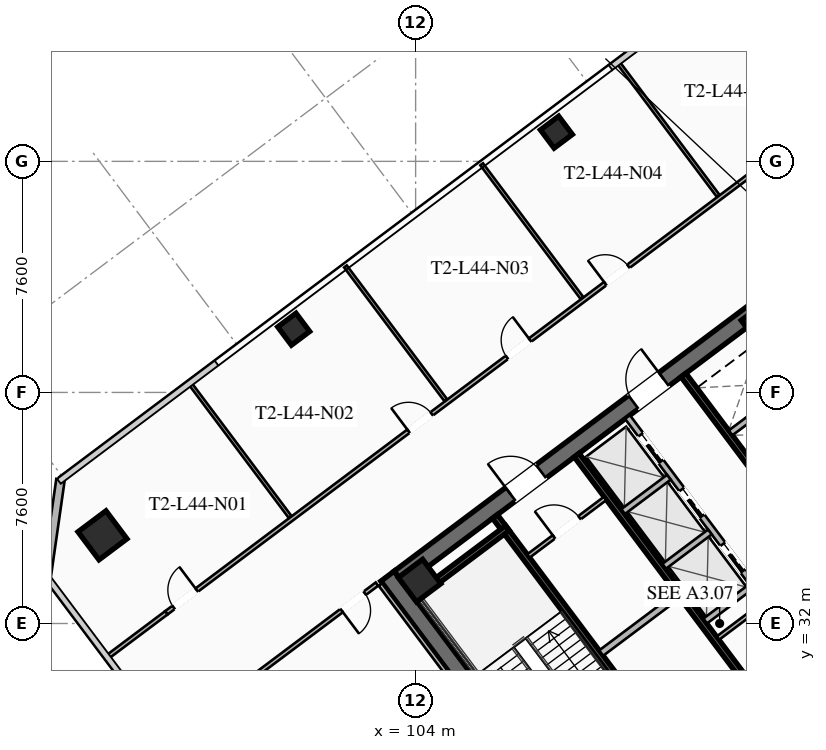
"""IFC4 building model, lengths in metres.
Left out: names, types, materials, properties, quantities, classifications, styles, units other than length and angle.
Written with IfcOpenShell. Run it as: python <this file> out.ifc"""

import sys

from ifc_helpers import new_model, si_unit, direction, frame, frame_2d, origin, origin_2d, place, context, subcontext, project, spatial, rectangle, hollow_rectangle, extrude, element, fill, save


model = new_model("IFC4")
c1 = context("Model", 3, precision=1e-05, world=origin(), true_north=direction((0.0, 1.0)))
c2 = subcontext(c1, "Body", "Model", "MODEL_VIEW")
j1 = project(units=[si_unit("LENGTHUNIT", "METRE"), si_unit("PLANEANGLEUNIT", "RADIAN")], contexts=[c1])
p1 = place(None, origin())
s1 = spatial("IfcSite", under=j1, at=p1, CompositionType="ELEMENT")
p2 = place(p1, origin())
s2 = spatial("IfcBuilding", under=s1, at=p2, CompositionType="ELEMENT")
p3 = place(p2, frame((0.0, 0.0, 164.1)))
s3 = spatial("IfcBuildingStorey", under=s2, at=p3, CompositionType="ELEMENT", Elevation=164.1)
p4 = place(p3, frame((112.436, 21.077, 0.0), z_axis=(0.0, 0.0, 1.0), x_axis=(-0.600005007985, 0.799996243986, 0.0)))
e1 = element("IfcWall", 1, at=p4, inside=s3, PredefinedType="SHEAR", context=c2, shape_type="SweptSolid", body=[
    extrude(rectangle(XDim=15.6, YDim=0.55, at=frame_2d((7.8, 0.0))), origin(), (0.0, 0.0, 1.0), 3.55),
])
p5 = place(p3, frame((124.539, 30.498, 0.0), z_axis=(0.0, 0.0, 1.0), x_axis=(-0.799998054672, -0.600002593761, 0.0)))
e2 = element("IfcWall", 2, at=p5, inside=s3, PredefinedType="SHEAR", context=c2, shape_type="SweptSolid", body=[
    extrude(rectangle(XDim=15.06, YDim=0.55, at=frame_2d((7.53, 0.0))), origin(), (0.0, 0.0, 1.0), 3.55),
])
p6 = place(p5, frame((9.23, 0.0, 0.0)))
e3 = element("IfcOpeningElement", 3, at=p6, cuts=e2, PredefinedType="OPENING", context=c2, shape_type="SweptSolid", body=[
    extrude(rectangle(XDim=1.25, YDim=2.25, at=frame_2d((0.625, 1.125))), frame((0.0, 0.285, 0.0), z_axis=(0.0, -1.0, 0.0), x_axis=(1.0, 0.0, 0.0)), (0.0, 0.0, 1.0), 0.57),
])
p7 = place(p5, frame((4.18, 0.0, 0.0)))
e4 = element("IfcOpeningElement", 4, at=p7, cuts=e2, PredefinedType="OPENING", context=c2, shape_type="SweptSolid", body=[
    extrude(rectangle(XDim=1.25, YDim=2.25, at=frame_2d((0.625, 1.125))), frame((0.0, 0.285, 0.0), z_axis=(0.0, -1.0, 0.0), x_axis=(1.0, 0.0, 0.0)), (0.0, 0.0, 1.0), 0.57),
])
p8 = place(p3, frame((103.461, 33.502, 0.0), z_axis=(0.0, 0.0, 1.0), x_axis=(0.799998054672, 0.600002593761, 0.0)))
e5 = element("IfcWall", 5, at=p8, inside=s3, PredefinedType="SHEAR", context=c2, shape_type="SweptSolid", body=[
    extrude(rectangle(XDim=15.06, YDim=0.55, at=frame_2d((7.53, 0.0))), origin(), (0.0, 0.0, 1.0), 3.55),
])
p9 = place(p8, frame((4.58, 0.0, 0.0)))
e6 = element("IfcOpeningElement", 6, at=p9, cuts=e5, PredefinedType="OPENING", context=c2, shape_type="SweptSolid", body=[
    extrude(rectangle(XDim=1.25, YDim=2.25, at=frame_2d((0.625, 1.125))), frame((0.0, 0.285, 0.0), z_axis=(0.0, -1.0, 0.0), x_axis=(1.0, 0.0, 0.0)), (0.0, 0.0, 1.0), 0.57),
])
p10 = place(p8, frame((9.63, 0.0, 0.0)))
e7 = element("IfcOpeningElement", 7, at=p10, cuts=e5, PredefinedType="OPENING", context=c2, shape_type="SweptSolid", body=[
    extrude(rectangle(XDim=1.25, YDim=2.25, at=frame_2d((0.625, 1.125))), frame((0.0, 0.285, 0.0), z_axis=(0.0, -1.0, 0.0), x_axis=(1.0, 0.0, 0.0)), (0.0, 0.0, 1.0), 0.57),
])
for number, where, z_axis, x_axis in (
    (8, (115.41, 41.87, 0.0), (0.0, 0.0, 1.0), (0.8, 0.6, 0.0)),
    (9, (104.13, 33.41, 0.0), (0.0, 0.0, 1.0), (0.8, 0.6, 0.0)),
):
    element("IfcColumn", number, at=place(p3, frame(where, z_axis=z_axis, x_axis=x_axis)), inside=s3, PredefinedType="COLUMN", context=c2, shape_type="SweptSolid", body=[
        extrude(hollow_rectangle(XDim=1.0, YDim=1.0, WallThickness=0.04, at=origin_2d()), origin(), (0.0, 0.0, 1.0), 3.37),
    ])
p11 = place(p3, frame((93.7, 34.9, 0.0), z_axis=(0.0, 0.0, 1.0), x_axis=(0.799999996291, 0.600000004945, 0.0)))
e10 = element("IfcColumn", 10, at=p11, inside=s3, PredefinedType="COLUMN", context=c2, shape_type="SweptSolid", body=[
    extrude(hollow_rectangle(XDim=1.15, YDim=1.15, WallThickness=0.045, at=origin_2d()), origin(), (0.0, 0.0, 1.0), 3.37),
])
for number, where, z_axis, x_axis in (
    (11, (108.63, 48.16, 0.0), (0.0, 0.0, 1.0), (0.8, 0.6, 0.0)),
    (12, (99.99, 41.68, 0.0), (0.0, 0.0, 1.0), (0.8, 0.6, 0.0)),
):
    element("IfcColumn", number, at=place(p3, frame(where, z_axis=z_axis, x_axis=x_axis)), inside=s3, PredefinedType="COLUMN", context=c2, shape_type="SweptSolid", body=[
        extrude(hollow_rectangle(XDim=0.75, YDim=0.75, WallThickness=0.032, at=origin_2d()), origin(), (0.0, 0.0, 1.0), 3.37),
    ])
p12 = place(p3, frame((91.86, 33.52, 0.0), z_axis=(0.0, 0.0, 1.0), x_axis=(0.141410847992, 0.989950994782, 0.0)))
e13 = element("IfcWall", 13, at=p12, inside=s3, PredefinedType="SOLIDWALL", context=c2, shape_type="SweptSolid", body=[
    extrude(rectangle(XDim=3.253, YDim=0.28, at=frame_2d((1.626, 0.0))), origin(), (0.0, 0.0, 1.0), 3.37),
])
p13 = place(p3, frame((111.44, 29.08, 0.0), z_axis=(0.0, 0.0, 1.0), x_axis=(-0.59999029481, 0.8000072788, 0.0)))
e14 = element("IfcWall", 14, at=p13, inside=s3, PredefinedType="SHEAR", context=c2, shape_type="SweptSolid", body=[
    extrude(rectangle(XDim=8.05, YDim=0.2, at=frame_2d((4.025, 0.0))), origin(), (0.0, 0.0, 1.0), 3.37),
])
p14 = place(p13, frame((0.45, 0.0, 0.0)))
e15 = element("IfcOpeningElement", 15, at=p14, cuts=e14, PredefinedType="OPENING", context=c2, shape_type="SweptSolid", body=[
    extrude(rectangle(XDim=1.15, YDim=2.2, at=frame_2d((0.575, 1.1))), frame((0.0, 0.11, 0.0), z_axis=(0.0, -1.0, 0.0), x_axis=(1.0, 0.0, 0.0)), (0.0, 0.0, 1.0), 0.22),
])
p15 = place(p3, frame((103.956, 32.842, 0.0), z_axis=(0.0, 0.0, 1.0), x_axis=(0.800015298837, 0.599979601008, 0.0)))
e16 = element("IfcWall", 16, at=p15, inside=s3, PredefinedType="SHEAR", context=c2, shape_type="SweptSolid", body=[
    extrude(rectangle(XDim=3.83, YDim=0.2, at=frame_2d((1.915, 0.0))), origin(), (0.0, 0.0, 1.0), 3.37),
])
p16 = place(p3, frame((117.998, 25.936, 0.0), z_axis=(0.0, 0.0, 1.0), x_axis=(-0.600002693989, 0.799997979501, 0.0)))
e17 = element("IfcWall", 17, at=p16, inside=s3, PredefinedType="SHEAR", context=c2, shape_type="SweptSolid", body=[
    extrude(rectangle(XDim=14.5, YDim=0.2, at=frame_2d((7.25, 0.0))), origin(), (0.0, 0.0, 1.0), 3.37),
])
p17 = place(p3, frame((110.104, 31.028, 0.0), z_axis=(0.0, 0.0, 1.0), x_axis=(0.800018601094, 0.59997519774, 0.0)))
e18 = element("IfcWall", 18, at=p17, inside=s3, PredefinedType="SOLIDWALL", context=c2, shape_type="SweptSolid", body=[
    extrude(rectangle(XDim=3.15, YDim=0.22, at=frame_2d((1.575, 0.0))), origin(), (0.0, 0.0, 1.0), 2.723),
])
p18 = place(p3, frame((112.81, 40.17, 0.0), z_axis=(0.0, 0.0, 1.0), x_axis=(0.599993943644, -0.800004542231, 0.0)))
e19 = element("IfcWall", 19, at=p18, inside=s3, PredefinedType="SHEAR", context=c2, shape_type="SweptSolid", body=[
    extrude(rectangle(XDim=6.45, YDim=0.2, at=frame_2d((3.225, 0.0))), origin(), (0.0, 0.0, 1.0), 3.37),
])
p19 = place(p3, frame((114.36, 38.27, 0.0), z_axis=(0.0, 0.0, 1.0), x_axis=(0.800008418847, 0.599988774707, 0.0)))
e20 = element("IfcWall", 20, at=p19, inside=s3, PredefinedType="SOLIDWALL", context=c2, shape_type="SweptSolid", body=[
    extrude(rectangle(XDim=3.48, YDim=0.2, at=frame_2d((1.74, 0.0))), origin(), (0.0, 0.0, 1.0), 3.37),
])
p20 = place(p3, frame((107.71, 34.22, 0.0), z_axis=(0.0, 0.0, 1.0), x_axis=(0.799981399002, 0.60002480053, 0.0)))
e21 = element("IfcWall", 21, at=p20, inside=s3, PredefinedType="PARTITIONING", context=c2, shape_type="SweptSolid", body=[
    extrude(rectangle(XDim=3.15, YDim=0.135, at=frame_2d((1.575, 0.0))), origin(), (0.0, 0.0, 1.0), 2.723),
])
p21 = place(p20, frame((1.05, 0.0, 0.0)))
e22 = element("IfcOpeningElement", 22, at=p21, cuts=e21, PredefinedType="OPENING", context=c2, shape_type="SweptSolid", body=[
    extrude(rectangle(XDim=1.05, YDim=2.2, at=frame_2d((0.525, 1.1))), frame((0.0, 0.077, 0.0), z_axis=(0.0, -1.0, 0.0), x_axis=(1.0, 0.0, 0.0)), (0.0, 0.0, 1.0), 0.155),
])
p22 = place(p3, frame((113.946, 31.522, 0.0), z_axis=(0.0, 0.0, 1.0), x_axis=(0.8, 0.6, 0.0)))
e23 = element("IfcWall", 23, at=p22, inside=s3, PredefinedType="PARTITIONING", context=c2, shape_type="SweptSolid", body=[
    extrude(rectangle(XDim=1.88, YDim=0.135, at=frame_2d((0.94, 0.0))), origin(), (0.0, 0.0, 1.0), 2.723),
])
p23 = place(p3, frame((115.11, 33.27, 0.0), z_axis=(0.0, 0.0, 1.0), x_axis=(-0.600011322243, 0.799991508192, 0.0)))
e24 = element("IfcWall", 24, at=p23, inside=s3, PredefinedType="SOLIDWALL", context=c2, shape_type="SweptSolid", body=[
    extrude(rectangle(XDim=6.9, YDim=0.2, at=frame_2d((3.45, 0.0))), origin(), (0.0, 0.0, 1.0), 3.37),
])
p24 = place(p23, frame((0.575, 0.0, 0.0)))
e25 = element("IfcOpeningElement", 25, at=p24, cuts=e24, PredefinedType="OPENING", context=c2, shape_type="SweptSolid", body=[
    extrude(rectangle(XDim=1.1, YDim=2.2, at=frame_2d((0.55, 1.1))), frame((0.0, 0.11, 0.0), z_axis=(0.0, -1.0, 0.0), x_axis=(1.0, 0.0, 0.0)), (0.0, 0.0, 1.0), 0.22),
])
p25 = place(p23, frame((2.825, 0.0, 0.0)))
e26 = element("IfcOpeningElement", 26, at=p25, cuts=e24, PredefinedType="OPENING", context=c2, shape_type="SweptSolid", body=[
    extrude(rectangle(XDim=1.1, YDim=2.2, at=frame_2d((0.55, 1.1))), frame((0.0, 0.11, 0.0), z_axis=(0.0, -1.0, 0.0), x_axis=(1.0, 0.0, 0.0)), (0.0, 0.0, 1.0), 0.22),
])
p26 = place(p23, frame((5.075, 0.0, 0.0)))
e27 = element("IfcOpeningElement", 27, at=p26, cuts=e24, PredefinedType="OPENING", context=c2, shape_type="SweptSolid", body=[
    extrude(rectangle(XDim=1.1, YDim=2.2, at=frame_2d((0.55, 1.1))), frame((0.0, 0.11, 0.0), z_axis=(0.0, -1.0, 0.0), x_axis=(1.0, 0.0, 0.0)), (0.0, 0.0, 1.0), 0.22),
])
p27 = place(p3, frame((113.526, 32.082, 0.0), z_axis=(0.0, 0.0, 1.0), x_axis=(0.800046745961, 0.599937666993, 0.0)))
e28 = element("IfcWall", 28, at=p27, inside=s3, PredefinedType="SOLIDWALL", context=c2, shape_type="SweptSolid", body=[
    extrude(rectangle(XDim=1.88, YDim=0.2, at=frame_2d((0.94, 0.0))), origin(), (0.0, 0.0, 1.0), 3.37),
])
p28 = place(p3, frame((112.176, 33.882, 0.0), z_axis=(0.0, 0.0, 1.0), x_axis=(0.8, 0.6, 0.0)))
e29 = element("IfcWall", 29, at=p28, inside=s3, PredefinedType="SOLIDWALL", context=c2, shape_type="SweptSolid", body=[
    extrude(rectangle(XDim=1.88, YDim=0.2, at=frame_2d((0.94, 0.0))), origin(), (0.0, 0.0, 1.0), 3.37),
])
p29 = place(p3, frame((110.826, 35.682, 0.0), z_axis=(0.0, 0.0, 1.0), x_axis=(0.799984418148, 0.600020775241, 0.0)))
e30 = element("IfcWall", 30, at=p29, inside=s3, PredefinedType="SOLIDWALL", context=c2, shape_type="SweptSolid", body=[
    extrude(rectangle(XDim=1.88, YDim=0.2, at=frame_2d((0.94, 0.0))), origin(), (0.0, 0.0, 1.0), 3.37),
])
p30 = place(p3, frame((95.8, 32.35, 0.0), z_axis=(0.0, 0.0, 1.0), x_axis=(0.8, 0.6, 0.0)))
e31 = element("IfcWall", 31, at=p30, inside=s3, PredefinedType="PARTITIONING", context=c2, shape_type="SweptSolid", body=[
    extrude(rectangle(XDim=28.7, YDim=0.135, at=frame_2d((14.35, 0.0))), origin(), (0.0, 0.0, 1.0), 2.723),
])
p31 = place(p30, frame((0.3, 0.0, 0.0)))
e32 = element("IfcOpeningElement", 32, at=p31, cuts=e31, PredefinedType="OPENING", context=c2, shape_type="SweptSolid", body=[
    extrude(rectangle(XDim=0.95, YDim=2.05, at=frame_2d((0.475, 1.025))), frame((0.0, 0.077, 0.0), z_axis=(0.0, -1.0, 0.0), x_axis=(1.0, 0.0, 0.0)), (0.0, 0.0, 1.0), 0.155),
])
p32 = place(p30, frame((9.959, 0.0, 0.0)))
e33 = element("IfcOpeningElement", 33, at=p32, cuts=e31, PredefinedType="OPENING", context=c2, shape_type="SweptSolid", body=[
    extrude(rectangle(XDim=0.95, YDim=2.05, at=frame_2d((0.475, 1.025))), frame((0.0, 0.077, 0.0), z_axis=(0.0, -1.0, 0.0), x_axis=(1.0, 0.0, 0.0)), (0.0, 0.0, 1.0), 0.155),
])
p33 = place(p30, frame((14.005, 0.0, 0.0)))
e34 = element("IfcOpeningElement", 34, at=p33, cuts=e31, PredefinedType="OPENING", context=c2, shape_type="SweptSolid", body=[
    extrude(rectangle(XDim=0.95, YDim=2.05, at=frame_2d((0.475, 1.025))), frame((0.0, 0.077, 0.0), z_axis=(0.0, -1.0, 0.0), x_axis=(1.0, 0.0, 0.0)), (0.0, 0.0, 1.0), 0.155),
])
p34 = place(p30, frame((18.049, 0.0, 0.0)))
e35 = element("IfcOpeningElement", 35, at=p34, cuts=e31, PredefinedType="OPENING", context=c2, shape_type="SweptSolid", body=[
    extrude(rectangle(XDim=0.95, YDim=2.05, at=frame_2d((0.475, 1.025))), frame((0.0, 0.077, 0.0), z_axis=(0.0, -1.0, 0.0), x_axis=(1.0, 0.0, 0.0)), (0.0, 0.0, 1.0), 0.155),
])
p35 = place(p30, frame((27.45, 0.0, 0.0)))
e36 = element("IfcOpeningElement", 36, at=p35, cuts=e31, PredefinedType="OPENING", context=c2, shape_type="SweptSolid", body=[
    extrude(rectangle(XDim=0.95, YDim=2.05, at=frame_2d((0.475, 1.025))), frame((0.0, 0.077, 0.0), z_axis=(0.0, -1.0, 0.0), x_axis=(1.0, 0.0, 0.0)), (0.0, 0.0, 1.0), 0.155),
])
p36 = place(p3, frame((93.856, 30.892, 0.0), z_axis=(0.0, 0.0, 1.0), x_axis=(0.800012055778, 0.599983925293, 0.0)))
e37 = element("IfcWall", 37, at=p36, inside=s3, PredefinedType="PARTITIONING", context=c2, shape_type="SweptSolid", body=[
    extrude(rectangle(XDim=2.43, YDim=0.135, at=frame_2d((1.215, 0.0))), origin(), (0.0, 0.0, 1.0), 2.723),
])
p37 = place(p3, frame((99.872, 35.504, 0.0), z_axis=(0.0, 0.0, 1.0), x_axis=(-0.599992897893, 0.800005326531, 0.0)))
e38 = element("IfcWall", 38, at=p37, inside=s3, PredefinedType="PARTITIONING", context=c2, shape_type="SweptSolid", body=[
    extrude(rectangle(XDim=5.5, YDim=0.11, at=frame_2d((2.75, 0.0))), origin(), (0.0, 0.0, 1.0), 2.723),
])
p38 = place(p3, frame((104.992, 39.344, 0.0), z_axis=(0.0, 0.0, 1.0), x_axis=(-0.600014204577, 0.79998934637, 0.0)))
e39 = element("IfcWall", 39, at=p38, inside=s3, PredefinedType="PARTITIONING", context=c2, shape_type="SweptSolid", body=[
    extrude(rectangle(XDim=5.5, YDim=0.11, at=frame_2d((2.75, 0.0))), origin(), (0.0, 0.0, 1.0), 2.723),
])
p39 = place(p3, frame((109.472, 42.704, 0.0), z_axis=(0.0, 0.0, 1.0), x_axis=(-0.599985794856, 0.800010653661, 0.0)))
e40 = element("IfcWall", 40, at=p39, inside=s3, PredefinedType="PARTITIONING", context=c2, shape_type="SweptSolid", body=[
    extrude(rectangle(XDim=5.5, YDim=0.11, at=frame_2d((2.75, 0.0))), origin(), (0.0, 0.0, 1.0), 2.723),
])
p40 = place(p3, frame((113.952, 46.064, 0.0), z_axis=(0.0, 0.0, 1.0), x_axis=(-0.599964488045, 0.800026632735, 0.0)))
e41 = element("IfcWall", 41, at=p40, inside=s3, PredefinedType="PARTITIONING", context=c2, shape_type="SweptSolid", body=[
    extrude(rectangle(XDim=5.5, YDim=0.11, at=frame_2d((2.75, 0.0))), origin(), (0.0, 0.0, 1.0), 2.723),
])
p41 = place(p3, frame((131.282, 32.874, 0.0), z_axis=(0.0, 0.0, 1.0), x_axis=(-0.8, -0.6, 0.0)))
e42 = element("IfcWall", 42, at=p41, inside=s3, PredefinedType="PARTITIONING", context=c2, shape_type="SweptSolid", body=[
    extrude(rectangle(XDim=28.7, YDim=0.135, at=frame_2d((14.35, 0.0))), origin(), (0.0, 0.0, 1.0), 2.723),
])
p42 = place(p41, frame((27.37, 0.0, 0.0)))
e43 = element("IfcOpeningElement", 43, at=p42, cuts=e42, PredefinedType="OPENING", context=c2, shape_type="SweptSolid", body=[
    extrude(rectangle(XDim=0.95, YDim=2.05, at=frame_2d((0.475, 1.025))), frame((0.0, 0.077, 0.0), z_axis=(0.0, -1.0, 0.0), x_axis=(1.0, 0.0, 0.0)), (0.0, 0.0, 1.0), 0.155),
])
p43 = place(p41, frame((13.592, 0.0, 0.0)))
e44 = element("IfcOpeningElement", 44, at=p43, cuts=e42, PredefinedType="OPENING", context=c2, shape_type="SweptSolid", body=[
    extrude(rectangle(XDim=0.95, YDim=2.05, at=frame_2d((0.475, 1.025))), frame((0.0, 0.077, 0.0), z_axis=(0.0, -1.0, 0.0), x_axis=(1.0, 0.0, 0.0)), (0.0, 0.0, 1.0), 0.155),
])
p44 = place(p41, frame((0.38, 0.0, 0.0)))
e45 = element("IfcOpeningElement", 45, at=p44, cuts=e42, PredefinedType="OPENING", context=c2, shape_type="SweptSolid", body=[
    extrude(rectangle(XDim=0.95, YDim=2.05, at=frame_2d((0.475, 1.025))), frame((0.0, 0.077, 0.0), z_axis=(0.0, -1.0, 0.0), x_axis=(1.0, 0.0, 0.0)), (0.0, 0.0, 1.0), 0.155),
])
p45 = place(p3, frame((112.104, 20.928, 0.0), z_axis=(0.0, 0.0, 1.0), x_axis=(-0.599994940075, 0.800003794918, 0.0)))
e46 = element("IfcWall", 46, at=p45, inside=s3, PredefinedType="PARTITIONING", context=c2, shape_type="SweptSolid", body=[
    extrude(rectangle(XDim=15.44, YDim=0.135, at=frame_2d((7.72, 0.0))), origin(), (0.0, 0.0, 1.0), 2.723),
])
p46 = place(p3, frame((102.728, 33.296, 0.0), z_axis=(0.0, 0.0, 1.0), x_axis=(-0.800013722153, -0.59998170336, 0.0)))
e47 = element("IfcWall", 47, at=p46, inside=s3, PredefinedType="PARTITIONING", context=c2, shape_type="SweptSolid", body=[
    extrude(rectangle(XDim=8.54, YDim=0.135, at=frame_2d((4.27, 0.0))), origin(), (0.0, 0.0, 1.0), 2.723),
])
p47 = place(p46, frame((0.5, 0.0, 0.0)))
e48 = element("IfcOpeningElement", 48, at=p47, cuts=e47, PredefinedType="OPENING", context=c2, shape_type="SweptSolid", body=[
    extrude(rectangle(XDim=0.95, YDim=2.05, at=frame_2d((0.475, 1.025))), frame((0.0, 0.077, 0.0), z_axis=(0.0, -1.0, 0.0), x_axis=(1.0, 0.0, 0.0)), (0.0, 0.0, 1.0), 0.155),
])
p48 = place(p9, origin())
e49 = element("IfcDoor", 49, at=p48, inside=s3, OperationType="SINGLE_SWING_LEFT", PredefinedType="DOOR", context=c2, shape_type="SweptSolid", body=[
    extrude(rectangle(XDim=1.25, YDim=2.25, at=frame_2d((0.625, 1.125))), frame((0.0, 0.025, 0.0), z_axis=(0.0, -1.0, 0.0), x_axis=(1.0, 0.0, 0.0)), (0.0, 0.0, 1.0), 0.05),
])
fill(e6, e49)
p49 = place(p10, origin())
e50 = element("IfcDoor", 50, at=p49, inside=s3, OperationType="SINGLE_SWING_RIGHT", PredefinedType="DOOR", context=c2, shape_type="SweptSolid", body=[
    extrude(rectangle(XDim=1.25, YDim=2.25, at=frame_2d((0.625, 1.125))), frame((0.0, 0.025, 0.0), z_axis=(0.0, -1.0, 0.0), x_axis=(1.0, 0.0, 0.0)), (0.0, 0.0, 1.0), 0.05),
])
fill(e7, e50)
p50 = place(p21, origin())
e51 = element("IfcDoor", 51, at=p50, inside=s3, OperationType="SINGLE_SWING_LEFT", PredefinedType="DOOR", context=c2, shape_type="SweptSolid", body=[
    extrude(rectangle(XDim=1.05, YDim=2.2, at=frame_2d((0.525, 1.1))), frame((0.0, 0.025, 0.0), z_axis=(0.0, -1.0, 0.0), x_axis=(1.0, 0.0, 0.0)), (0.0, 0.0, 1.0), 0.05),
])
fill(e22, e51)
p51 = place(p31, origin())
e52 = element("IfcDoor", 52, at=p51, inside=s3, OperationType="SINGLE_SWING_RIGHT", PredefinedType="DOOR", context=c2, shape_type="SweptSolid", body=[
    extrude(rectangle(XDim=0.95, YDim=2.05, at=frame_2d((0.475, 1.025))), frame((0.0, 0.025, 0.0), z_axis=(0.0, -1.0, 0.0), x_axis=(1.0, 0.0, 0.0)), (0.0, 0.0, 1.0), 0.05),
])
fill(e32, e52)
p52 = place(p32, origin())
e53 = element("IfcDoor", 53, at=p52, inside=s3, OperationType="SINGLE_SWING_LEFT", PredefinedType="DOOR", context=c2, shape_type="SweptSolid", body=[
    extrude(rectangle(XDim=0.95, YDim=2.05, at=frame_2d((0.475, 1.025))), frame((0.0, 0.025, 0.0), z_axis=(0.0, -1.0, 0.0), x_axis=(1.0, 0.0, 0.0)), (0.0, 0.0, 1.0), 0.05),
])
fill(e33, e53)
p53 = place(p33, origin())
e54 = element("IfcDoor", 54, at=p53, inside=s3, OperationType="SINGLE_SWING_RIGHT", PredefinedType="DOOR", context=c2, shape_type="SweptSolid", body=[
    extrude(rectangle(XDim=0.95, YDim=2.05, at=frame_2d((0.475, 1.025))), frame((0.0, 0.025, 0.0), z_axis=(0.0, -1.0, 0.0), x_axis=(1.0, 0.0, 0.0)), (0.0, 0.0, 1.0), 0.05),
])
fill(e34, e54)
p54 = place(p34, origin())
e55 = element("IfcDoor", 55, at=p54, inside=s3, OperationType="SINGLE_SWING_LEFT", PredefinedType="DOOR", context=c2, shape_type="SweptSolid", body=[
    extrude(rectangle(XDim=0.95, YDim=2.05, at=frame_2d((0.475, 1.025))), frame((0.0, 0.025, 0.0), z_axis=(0.0, -1.0, 0.0), x_axis=(1.0, 0.0, 0.0)), (0.0, 0.0, 1.0), 0.05),
])
fill(e35, e55)
p55 = place(p47, origin())
e56 = element("IfcDoor", 56, at=p55, inside=s3, OperationType="SINGLE_SWING_RIGHT", PredefinedType="DOOR", context=c2, shape_type="SweptSolid", body=[
    extrude(rectangle(XDim=0.95, YDim=2.05, at=frame_2d((0.475, 1.025))), frame((0.0, 0.025, 0.0), z_axis=(0.0, -1.0, 0.0), x_axis=(1.0, 0.0, 0.0)), (0.0, 0.0, 1.0), 0.05),
])
fill(e48, e56)
p56 = place(p24, origin())
e57 = element("IfcDoor", 57, at=p56, inside=s3, OperationType="SLIDING_TO_LEFT", PredefinedType="DOOR", context=c2, shape_type="SweptSolid", body=[
    extrude(rectangle(XDim=1.1, YDim=2.2, at=frame_2d((0.55, 1.1))), frame((0.0, 0.025, 0.0), z_axis=(0.0, -1.0, 0.0), x_axis=(1.0, 0.0, 0.0)), (0.0, 0.0, 1.0), 0.05),
])
fill(e25, e57)
p57 = place(p25, origin())
e58 = element("IfcDoor", 58, at=p57, inside=s3, OperationType="SLIDING_TO_LEFT", PredefinedType="DOOR", context=c2, shape_type="SweptSolid", body=[
    extrude(rectangle(XDim=1.1, YDim=2.2, at=frame_2d((0.55, 1.1))), frame((0.0, 0.025, 0.0), z_axis=(0.0, -1.0, 0.0), x_axis=(1.0, 0.0, 0.0)), (0.0, 0.0, 1.0), 0.05),
])
fill(e26, e58)
p58 = place(p26, origin())
e59 = element("IfcDoor", 59, at=p58, inside=s3, OperationType="SLIDING_TO_LEFT", PredefinedType="DOOR", context=c2, shape_type="SweptSolid", body=[
    extrude(rectangle(XDim=1.1, YDim=2.2, at=frame_2d((0.55, 1.1))), frame((0.0, 0.025, 0.0), z_axis=(0.0, -1.0, 0.0), x_axis=(1.0, 0.0, 0.0)), (0.0, 0.0, 1.0), 0.05),
])
fill(e27, e59)
save(model, sys.argv[1])
